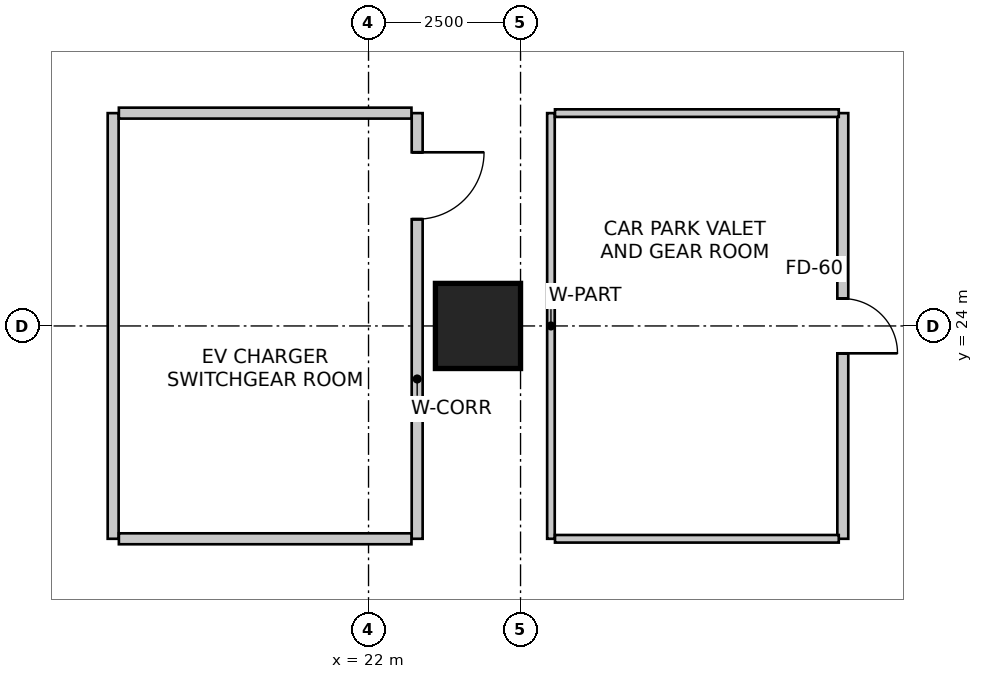
"""IFC4 building model, lengths in metres.
Left out: names, types, materials, properties, quantities, classifications, styles, units other than length and angle.
Written with IfcOpenShell. Run it as: python <this file> out.ifc"""

import sys

from ifc_helpers import new_model, si_unit, direction, frame, frame_2d, origin, origin_2d, place, context, subcontext, project, spatial, rectangle, extrude, source, transform, mapped, element, fill, save


model = new_model("IFC4")
c1 = context("Model", 3, precision=1e-05, world=origin(), true_north=direction((0.0, 1.0)))
c2 = subcontext(c1, "Body", "Model", "MODEL_VIEW")
j1 = project(units=[si_unit("LENGTHUNIT", "METRE"), si_unit("PLANEANGLEUNIT", "RADIAN")], contexts=[c1])
p1 = place(None, origin())
s1 = spatial("IfcSite", under=j1, at=p1, CompositionType="ELEMENT")
p2 = place(p1, origin())
s2 = spatial("IfcBuilding", under=s1, at=p2, CompositionType="ELEMENT")
p3 = place(p2, frame((0.0, 0.0, -5.4)))
s3 = spatial("IfcBuildingStorey", under=s2, at=p3, CompositionType="ELEMENT", Elevation=-5.4)
m1 = source(origin(), c2, "Body", "SweptSolid", [
    extrude(rectangle(XDim=1.4, YDim=1.4, at=origin_2d()), origin(), (0.0, 0.0, 1.0), 5.4),
])
p4 = place(p3, frame((23.8, 24.0, 0.0), z_axis=(0.0, 0.0, 1.0), x_axis=(1.0, 0.0, 0.0)))
e1 = element("IfcColumn", 1, at=p4, inside=s3, PredefinedType="COLUMN", context=c2, shape_type="MappedRepresentation", body=[
    mapped(m1, transform((0.0, 0.0, 0.0), scale=1.0)),
])
p5 = place(p3, frame((22.8, 27.5, 0.0), z_axis=(0.0, 0.0, 1.0), x_axis=(0.0, -1.0, 0.0)))
e2 = element("IfcWall", 2, at=p5, inside=s3, PredefinedType="PARTITIONING", context=c2, shape_type="SweptSolid", body=[
    extrude(rectangle(XDim=7.0, YDim=0.18, at=frame_2d((3.5, 0.0))), origin(), (0.0, 0.0, 1.0), 4.457),
])
m2 = source(origin(), c2, "Body", "SweptSolid", [
    extrude(rectangle(XDim=1.1, YDim=2.15, at=frame_2d((0.55, 1.075))), frame((0.0, 0.1, 0.0), z_axis=(0.0, -1.0, 0.0), x_axis=(1.0, 0.0, 0.0)), (0.0, 0.0, 1.0), 0.2),
])
p6 = place(p5, frame((0.644, 0.0, 0.0)))
e3 = element("IfcOpeningElement", 3, at=p6, cuts=e2, PredefinedType="OPENING", context=c2, shape_type="MappedRepresentation", body=[
    mapped(m2, transform((0.0, 0.0, 0.0), scale=1.0)),
])
p7 = place(p3, frame((17.8, 20.5, 0.0), z_axis=(0.0, 0.0, 1.0), x_axis=(0.0, 1.0, 0.0)))
e4 = element("IfcWall", 4, at=p7, inside=s3, PredefinedType="PARTITIONING", context=c2, shape_type="SweptSolid", body=[
    extrude(rectangle(XDim=7.0, YDim=0.18, at=frame_2d((3.5, 0.0))), origin(), (0.0, 0.0, 1.0), 4.457),
])
p8 = place(p3, frame((17.894, 27.5, 0.0), z_axis=(0.0, 0.0, 1.0), x_axis=(1.0, 0.0, 0.0)))
e5 = element("IfcWall", 5, at=p8, inside=s3, PredefinedType="PARTITIONING", context=c2, shape_type="SweptSolid", body=[
    extrude(rectangle(XDim=4.812, YDim=0.18, at=frame_2d((2.406, 0.0))), origin(), (0.0, 0.0, 1.0), 5.1),
])
p9 = place(p3, frame((22.706, 20.5, 0.0), z_axis=(0.0, 0.0, 1.0), x_axis=(-1.0, 0.0, 0.0)))
e6 = element("IfcWall", 6, at=p9, inside=s3, PredefinedType="PARTITIONING", context=c2, shape_type="SweptSolid", body=[
    extrude(rectangle(XDim=4.812, YDim=0.18, at=frame_2d((2.406, 0.0))), origin(), (0.0, 0.0, 1.0), 4.629),
])
p10 = place(p3, frame((29.8, 27.5, 0.0), z_axis=(0.0, 0.0, 1.0), x_axis=(0.0, -1.0, 0.0)))
e7 = element("IfcWall", 7, at=p10, inside=s3, PredefinedType="PARTITIONING", context=c2, shape_type="SweptSolid", body=[
    extrude(rectangle(XDim=7.0, YDim=0.18, at=frame_2d((3.5, 0.0))), origin(), (0.0, 0.0, 1.0), 4.672),
])
m3 = source(origin(), c2, "Body", "SweptSolid", [
    extrude(rectangle(XDim=0.9, YDim=2.15, at=frame_2d((0.45, 1.075))), frame((0.0, 0.1, 0.0), z_axis=(0.0, -1.0, 0.0), x_axis=(1.0, 0.0, 0.0)), (0.0, 0.0, 1.0), 0.2),
])
p11 = place(p10, frame((3.05, 0.0, 0.0)))
e8 = element("IfcOpeningElement", 8, at=p11, cuts=e7, PredefinedType="OPENING", context=c2, shape_type="MappedRepresentation", body=[
    mapped(m3, transform((0.0, 0.0, 0.0), scale=1.0)),
])
p12 = place(p3, frame((25.0, 20.5, 0.0), z_axis=(0.0, 0.0, 1.0), x_axis=(0.0, 1.0, 0.0)))
e9 = element("IfcWall", 9, at=p12, inside=s3, PredefinedType="PARTITIONING", context=c2, shape_type="SweptSolid", body=[
    extrude(rectangle(XDim=7.0, YDim=0.125, at=frame_2d((3.5, 0.0))), origin(), (0.0, 0.0, 1.0), 5.1),
])
p13 = place(p3, frame((25.066, 27.5, 0.0), z_axis=(0.0, 0.0, 1.0), x_axis=(1.0, 0.0, 0.0)))
e10 = element("IfcWall", 10, at=p13, inside=s3, PredefinedType="PARTITIONING", context=c2, shape_type="SweptSolid", body=[
    extrude(rectangle(XDim=4.667, YDim=0.125, at=frame_2d((2.333, 0.0))), origin(), (0.0, 0.0, 1.0), 5.1),
])
p14 = place(p3, frame((29.733, 20.5, 0.0), z_axis=(0.0, 0.0, 1.0), x_axis=(-1.0, 0.0, 0.0)))
e11 = element("IfcWall", 11, at=p14, inside=s3, PredefinedType="PARTITIONING", context=c2, shape_type="SweptSolid", body=[
    extrude(rectangle(XDim=4.667, YDim=0.125, at=frame_2d((2.333, 0.0))), origin(), (0.0, 0.0, 1.0), 4.672),
])
m4 = source(origin(), c2, "Body", "SweptSolid", [
    extrude(rectangle(XDim=1.1, YDim=2.15, at=frame_2d((0.55, 1.075))), frame((0.0, 0.025, 0.0), z_axis=(0.0, -1.0, 0.0), x_axis=(1.0, 0.0, 0.0)), (0.0, 0.0, 1.0), 0.05),
])
p15 = place(p6, origin())
e12 = element("IfcDoor", 12, at=p15, inside=s3, OperationType="SINGLE_SWING_LEFT", PredefinedType="DOOR", context=c2, shape_type="MappedRepresentation", body=[
    mapped(m4, transform((0.0, 0.0, 0.0), scale=1.0)),
])
fill(e3, e12)
m5 = source(origin(), c2, "Body", "SweptSolid", [
    extrude(rectangle(XDim=0.9, YDim=2.15, at=frame_2d((0.45, 1.075))), frame((0.0, 0.025, 0.0), z_axis=(0.0, -1.0, 0.0), x_axis=(1.0, 0.0, 0.0)), (0.0, 0.0, 1.0), 0.05),
])
p16 = place(p11, origin())
e13 = element("IfcDoor", 13, at=p16, inside=s3, OperationType="SINGLE_SWING_RIGHT", PredefinedType="DOOR", context=c2, shape_type="MappedRepresentation", body=[
    mapped(m5, transform((0.0, 0.0, 0.0), scale=1.0)),
])
fill(e8, e13)
save(model, sys.argv[1])
